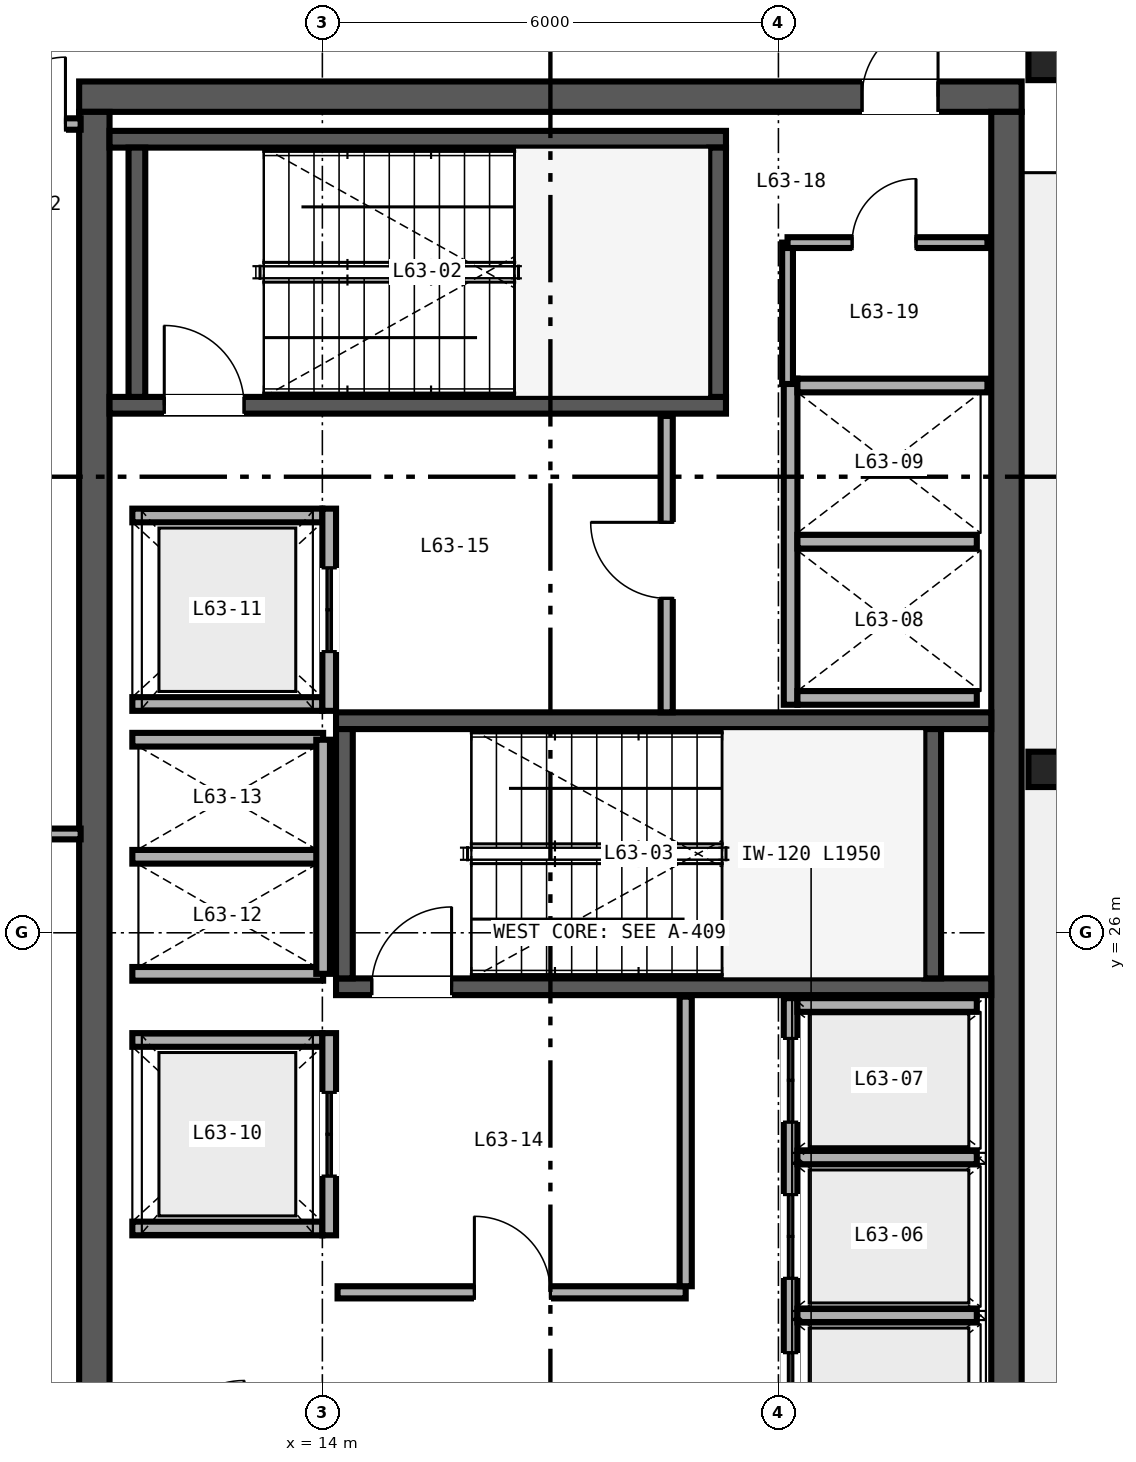
"""IFC4 building model, lengths in metres.
Left out: names, types, materials, properties, quantities, classifications, styles, units other than length and angle.
Written with IfcOpenShell. Run it as: python <this file> out.ifc"""

import sys

from ifc_helpers import new_model, si_unit, direction, frame, frame_2d, origin, origin_2d, place, context, subcontext, project, spatial, rectangle, i_section, extrude, source, transform, mapped, element, fill, save


model = new_model("IFC4")
c1 = context("Model", 3, precision=1e-05, world=origin(), true_north=direction((0.0, 1.0)))
c2 = subcontext(c1, "Body", "Model", "MODEL_VIEW")
j1 = project(units=[si_unit("LENGTHUNIT", "METRE"), si_unit("PLANEANGLEUNIT", "RADIAN")], contexts=[c1])
p1 = place(None, origin())
s1 = spatial("IfcSite", under=j1, at=p1, CompositionType="ELEMENT")
p2 = place(p1, origin())
s2 = spatial("IfcBuilding", under=s1, at=p2, CompositionType="ELEMENT")
p3 = place(p2, frame((0.0, 0.0, 250.8)))
s3 = spatial("IfcBuildingStorey", under=s2, at=p3, CompositionType="ELEMENT", Elevation=250.8)
p4 = place(p3, frame((10.8, 37.0, 0.0), z_axis=(0.0, 0.0, 1.0), x_axis=(1.0, 0.0, 0.0)))
e1 = element("IfcWall", 1, at=p4, inside=s3, PredefinedType="SHEAR", context=c2, shape_type="SweptSolid", body=[
    extrude(rectangle(XDim=12.4, YDim=0.4, at=frame_2d((6.2, 0.0))), origin(), (0.0, 0.0, 1.0), 3.38),
])
p5 = place(p4, frame((10.3, 0.0, 0.0)))
e2 = element("IfcOpeningElement", 2, at=p5, cuts=e1, PredefinedType="OPENING", context=c2, shape_type="SweptSolid", body=[
    extrude(rectangle(XDim=1.0, YDim=2.15, at=frame_2d((0.5, 1.075))), frame((0.0, 0.21, 0.0), z_axis=(0.0, -1.0, 0.0), x_axis=(1.0, 0.0, 0.0)), (0.0, 0.0, 1.0), 0.42),
])
for number, where, z_axis, x_axis in (
    (3, (11.0, 15.2, 0.0), (0.0, 0.0, 1.0), (0.0, 1.0, 0.0)),
    (4, (23.0, 15.2, 0.0), (0.0, 0.0, 1.0), (0.0, 1.0, 0.0)),
):
    element("IfcWall", number, at=place(p3, frame(where, z_axis=z_axis, x_axis=x_axis)), inside=s3, PredefinedType="SHEAR", context=c2, shape_type="SweptSolid", body=[
        extrude(rectangle(XDim=21.6, YDim=0.4, at=frame_2d((10.8, 0.0))), origin(), (0.0, 0.0, 1.0), 3.38),
    ])
p6 = place(p3, frame((11.2, 32.94, 0.0), z_axis=(0.0, 0.0, 1.0), x_axis=(1.0, 0.0, 0.0)))
e5 = element("IfcWall", 5, at=p6, inside=s3, PredefinedType="SHEAR", context=c2, shape_type="SweptSolid", body=[
    extrude(rectangle(XDim=8.11, YDim=0.22, at=frame_2d((4.055, 0.0))), origin(), (0.0, 0.0, 1.0), 3.4),
])
p7 = place(p6, frame((0.72, 0.0, 0.0)))
e6 = element("IfcOpeningElement", 6, at=p7, cuts=e5, PredefinedType="OPENING", context=c2, shape_type="SweptSolid", body=[
    extrude(rectangle(XDim=1.05, YDim=2.15, at=frame_2d((0.525, 1.075))), frame((0.0, 0.12, 0.0), z_axis=(0.0, -1.0, 0.0), x_axis=(1.0, 0.0, 0.0)), (0.0, 0.0, 1.0), 0.24),
])
p8 = place(p3, frame((11.2, 36.44, 0.0), z_axis=(0.0, 0.0, 1.0), x_axis=(1.0, 0.0, 0.0)))
e7 = element("IfcWall", 7, at=p8, inside=s3, PredefinedType="SHEAR", context=c2, shape_type="SweptSolid", body=[
    extrude(rectangle(XDim=8.11, YDim=0.22, at=frame_2d((4.055, 0.0))), origin(), (0.0, 0.0, 1.0), 3.4),
])
for number, where, z_axis, x_axis in (
    (8, (11.56, 33.05, 0.0), (0.0, 0.0, 1.0), (0.0, 1.0, 0.0)),
    (9, (19.2, 33.05, 0.0), (0.0, 0.0, 1.0), (0.0, 1.0, 0.0)),
):
    element("IfcWall", number, at=place(p3, frame(where, z_axis=z_axis, x_axis=x_axis)), inside=s3, PredefinedType="SHEAR", context=c2, shape_type="SweptSolid", body=[
        extrude(rectangle(XDim=3.28, YDim=0.22, at=frame_2d((1.64, 0.0))), origin(), (0.0, 0.0, 1.0), 3.4),
    ])
p9 = place(p3, frame((14.18, 25.29, 0.0), z_axis=(0.0, 0.0, 1.0), x_axis=(1.0, 0.0, 0.0)))
e10 = element("IfcWall", 10, at=p9, inside=s3, PredefinedType="SHEAR", context=c2, shape_type="SweptSolid", body=[
    extrude(rectangle(XDim=8.62, YDim=0.22, at=frame_2d((4.31, 0.0))), origin(), (0.0, 0.0, 1.0), 3.4),
])
p10 = place(p9, frame((0.47, 0.0, 0.0)))
e11 = element("IfcOpeningElement", 11, at=p10, cuts=e10, PredefinedType="OPENING", context=c2, shape_type="SweptSolid", body=[
    extrude(rectangle(XDim=1.05, YDim=2.15, at=frame_2d((0.525, 1.075))), frame((0.0, 0.12, 0.0), z_axis=(0.0, -1.0, 0.0), x_axis=(1.0, 0.0, 0.0)), (0.0, 0.0, 1.0), 0.24),
])
p11 = place(p3, frame((14.18, 28.79, 0.0), z_axis=(0.0, 0.0, 1.0), x_axis=(1.0, 0.0, 0.0)))
e12 = element("IfcWall", 12, at=p11, inside=s3, PredefinedType="SHEAR", context=c2, shape_type="SweptSolid", body=[
    extrude(rectangle(XDim=8.62, YDim=0.22, at=frame_2d((4.31, 0.0))), origin(), (0.0, 0.0, 1.0), 3.4),
])
for number, where, z_axis, x_axis in (
    (13, (14.29, 25.4, 0.0), (0.0, 0.0, 1.0), (0.0, 1.0, 0.0)),
    (14, (22.03, 25.4, 0.0), (0.0, 0.0, 1.0), (0.0, 1.0, 0.0)),
):
    element("IfcWall", number, at=place(p3, frame(where, z_axis=z_axis, x_axis=x_axis)), inside=s3, PredefinedType="SHEAR", context=c2, shape_type="SweptSolid", body=[
        extrude(rectangle(XDim=3.28, YDim=0.22, at=frame_2d((1.64, 0.0))), origin(), (0.0, 0.0, 1.0), 3.4),
    ])
m1 = source(origin(), c2, "Body", "SweptSolid", [
    extrude(i_section(OverallWidth=0.422, OverallDepth=0.465, WebThickness=0.045, FlangeThickness=0.073, FilletRadius=0.025, at=origin_2d()), origin(), (0.0, 0.0, 1.0), 3.38),
])
for number, where, z_axis, x_axis in (
    (15, (23.5, 28.15, 0.0), (0.0, 0.0, 1.0), (1.0, 0.0, 0.0)),
    (16, (23.5, 37.45, 0.0), (0.0, 0.0, 1.0), (1.0, 0.0, 0.0)),
):
    element("IfcColumn", number, at=place(p3, frame(where, z_axis=z_axis, x_axis=x_axis)), inside=s3, PredefinedType="COLUMN", context=c2, shape_type="MappedRepresentation", body=[
        mapped(m1, transform((0.0, 0.0, 0.0), scale=1.0)),
    ])
p12 = place(p3, frame((20.16, 18.82, 0.0), z_axis=(0.0, 0.0, 1.0), x_axis=(0.0, 1.0, 0.0)))
e17 = element("IfcWall", 17, at=p12, inside=s3, PredefinedType="SOLIDWALL", context=c2, shape_type="SweptSolid", body=[
    extrude(rectangle(XDim=6.32, YDim=0.18, at=frame_2d((3.16, 0.0))), origin(), (0.0, 0.0, 1.0), 2.48),
])
p13 = place(p12, frame((0.555, 0.0, 0.0)))
e18 = element("IfcOpeningElement", 18, at=p13, cuts=e17, PredefinedType="OPENING", context=c2, shape_type="SweptSolid", body=[
    extrude(rectangle(XDim=1.1, YDim=2.2, at=frame_2d((0.55, 1.1))), frame((0.0, 0.1, 0.0), z_axis=(0.0, -1.0, 0.0), x_axis=(1.0, 0.0, 0.0)), (0.0, 0.0, 1.0), 0.2),
])
p14 = place(p12, frame((2.635, 0.0, 0.0)))
e19 = element("IfcOpeningElement", 19, at=p14, cuts=e17, PredefinedType="OPENING", context=c2, shape_type="SweptSolid", body=[
    extrude(rectangle(XDim=1.1, YDim=2.2, at=frame_2d((0.55, 1.1))), frame((0.0, 0.1, 0.0), z_axis=(0.0, -1.0, 0.0), x_axis=(1.0, 0.0, 0.0)), (0.0, 0.0, 1.0), 0.2),
])
p15 = place(p12, frame((4.69, 0.0, 0.0)))
e20 = element("IfcOpeningElement", 20, at=p15, cuts=e17, PredefinedType="OPENING", context=c2, shape_type="SweptSolid", body=[
    extrude(rectangle(XDim=1.1, YDim=2.2, at=frame_2d((0.55, 1.1))), frame((0.0, 0.1, 0.0), z_axis=(0.0, -1.0, 0.0), x_axis=(1.0, 0.0, 0.0)), (0.0, 0.0, 1.0), 0.2),
])
p16 = place(p3, frame((20.25, 25.05, 0.0), z_axis=(0.0, 0.0, 1.0), x_axis=(1.0, 0.0, 0.0)))
e21 = element("IfcWall", 21, at=p16, inside=s3, PredefinedType="SOLIDWALL", context=c2, shape_type="SweptSolid", body=[
    extrude(rectangle(XDim=2.36, YDim=0.18, at=frame_2d((1.18, 0.0))), origin(), (0.0, 0.0, 1.0), 3.38),
])
p17 = place(p3, frame((20.25, 20.965, 0.0), z_axis=(0.0, 0.0, 1.0), x_axis=(1.0, 0.0, 0.0)))
e22 = element("IfcWall", 22, at=p17, inside=s3, PredefinedType="SOLIDWALL", context=c2, shape_type="SweptSolid", body=[
    extrude(rectangle(XDim=2.36, YDim=0.18, at=frame_2d((1.18, 0.0))), origin(), (0.0, 0.0, 1.0), 2.48),
])
p18 = place(p3, frame((20.25, 23.045, 0.0), z_axis=(0.0, 0.0, 1.0), x_axis=(1.0, 0.0, 0.0)))
e23 = element("IfcWall", 23, at=p18, inside=s3, PredefinedType="SOLIDWALL", context=c2, shape_type="SweptSolid", body=[
    extrude(rectangle(XDim=2.36, YDim=0.18, at=frame_2d((1.18, 0.0))), origin(), (0.0, 0.0, 1.0), 3.38),
])
p19 = place(p3, frame((20.16, 29.0, 0.0), z_axis=(0.0, 0.0, 1.0), x_axis=(0.0, 1.0, 0.0)))
e24 = element("IfcWall", 24, at=p19, inside=s3, PredefinedType="SOLIDWALL", context=c2, shape_type="SweptSolid", body=[
    extrude(rectangle(XDim=4.29, YDim=0.18, at=frame_2d((2.145, 0.0))), origin(), (0.0, 0.0, 1.0), 3.38),
])
p20 = place(p3, frame((20.25, 29.09, 0.0), z_axis=(0.0, 0.0, 1.0), x_axis=(1.0, 0.0, 0.0)))
e25 = element("IfcWall", 25, at=p20, inside=s3, PredefinedType="SOLIDWALL", context=c2, shape_type="SweptSolid", body=[
    extrude(rectangle(XDim=2.36, YDim=0.18, at=frame_2d((1.18, 0.0))), origin(), (0.0, 0.0, 1.0), 3.38),
])
p21 = place(p3, frame((20.25, 33.2, 0.0), z_axis=(0.0, 0.0, 1.0), x_axis=(1.0, 0.0, 0.0)))
e26 = element("IfcWall", 26, at=p21, inside=s3, PredefinedType="SOLIDWALL", context=c2, shape_type="SweptSolid", body=[
    extrude(rectangle(XDim=2.5, YDim=0.18, at=frame_2d((1.25, 0.0))), origin(), (0.0, 0.0, 1.0), 3.38),
])
p22 = place(p3, frame((20.25, 31.145, 0.0), z_axis=(0.0, 0.0, 1.0), x_axis=(1.0, 0.0, 0.0)))
e27 = element("IfcWall", 27, at=p22, inside=s3, PredefinedType="SOLIDWALL", context=c2, shape_type="SweptSolid", body=[
    extrude(rectangle(XDim=2.36, YDim=0.18, at=frame_2d((1.18, 0.0))), origin(), (0.0, 0.0, 1.0), 3.38),
])
for number, where, z_axis, x_axis in (
    (28, (11.5, 22.11, 0.0), (0.0, 0.0, 1.0), (1.0, 0.0, 0.0)),
    (29, (11.5, 24.59, 0.0), (0.0, 0.0, 1.0), (1.0, 0.0, 0.0)),
):
    element("IfcWall", number, at=place(p3, frame(where, z_axis=z_axis, x_axis=x_axis)), inside=s3, PredefinedType="SOLIDWALL", context=c2, shape_type="SweptSolid", body=[
        extrude(rectangle(XDim=2.5, YDim=0.18, at=frame_2d((1.25, 0.0))), origin(), (0.0, 0.0, 1.0), 3.38),
    ])
p23 = place(p3, frame((14.09, 22.02, 0.0), z_axis=(0.0, 0.0, 1.0), x_axis=(0.0, 1.0, 0.0)))
e30 = element("IfcWall", 30, at=p23, inside=s3, PredefinedType="SOLIDWALL", context=c2, shape_type="SweptSolid", body=[
    extrude(rectangle(XDim=2.66, YDim=0.18, at=frame_2d((1.33, 0.0))), origin(), (0.0, 0.0, 1.0), 3.38),
])
p24 = place(p23, frame((0.78, 0.0, 0.0)))
e31 = element("IfcOpeningElement", 31, at=p24, cuts=e30, PredefinedType="OPENING", context=c2, shape_type="SweptSolid", body=[
    extrude(rectangle(XDim=1.1, YDim=2.2, at=frame_2d((0.55, 1.1))), frame((0.0, 0.1, 0.0), z_axis=(0.0, -1.0, 0.0), x_axis=(1.0, 0.0, 0.0)), (0.0, 0.0, 1.0), 0.2),
])
for number, where, z_axis, x_axis in (
    (32, (11.5, 29.01, 0.0), (0.0, 0.0, 1.0), (1.0, 0.0, 0.0)),
    (33, (11.5, 31.49, 0.0), (0.0, 0.0, 1.0), (1.0, 0.0, 0.0)),
):
    element("IfcWall", number, at=place(p3, frame(where, z_axis=z_axis, x_axis=x_axis)), inside=s3, PredefinedType="SOLIDWALL", context=c2, shape_type="SweptSolid", body=[
        extrude(rectangle(XDim=2.5, YDim=0.18, at=frame_2d((1.25, 0.0))), origin(), (0.0, 0.0, 1.0), 3.38),
    ])
p25 = place(p3, frame((14.09, 28.92, 0.0), z_axis=(0.0, 0.0, 1.0), x_axis=(0.0, 1.0, 0.0)))
e34 = element("IfcWall", 34, at=p25, inside=s3, PredefinedType="SOLIDWALL", context=c2, shape_type="SweptSolid", body=[
    extrude(rectangle(XDim=2.66, YDim=0.18, at=frame_2d((1.33, 0.0))), origin(), (0.0, 0.0, 1.0), 3.38),
])
p26 = place(p25, frame((0.78, 0.0, 0.0)))
e35 = element("IfcOpeningElement", 35, at=p26, cuts=e34, PredefinedType="OPENING", context=c2, shape_type="SweptSolid", body=[
    extrude(rectangle(XDim=1.1, YDim=2.2, at=frame_2d((0.55, 1.1))), frame((0.0, 0.1, 0.0), z_axis=(0.0, -1.0, 0.0), x_axis=(1.0, 0.0, 0.0)), (0.0, 0.0, 1.0), 0.2),
])
for number, where, z_axis, x_axis in (
    (36, (11.5, 25.46, 0.0), (0.0, 0.0, 1.0), (1.0, 0.0, 0.0)),
    (37, (11.5, 27.0, 0.0), (0.0, 0.0, 1.0), (1.0, 0.0, 0.0)),
    (38, (11.5, 28.54, 0.0), (0.0, 0.0, 1.0), (1.0, 0.0, 0.0)),
):
    element("IfcWall", number, at=place(p3, frame(where, z_axis=z_axis, x_axis=x_axis)), inside=s3, PredefinedType="SOLIDWALL", context=c2, shape_type="SweptSolid", body=[
        extrude(rectangle(XDim=2.51, YDim=0.18, at=frame_2d((1.255, 0.0))), origin(), (0.0, 0.0, 1.0), 3.38),
    ])
p27 = place(p3, frame((14.01, 25.46, 0.0), z_axis=(0.0, 0.0, 1.0), x_axis=(0.0, 1.0, 0.0)))
e39 = element("IfcWall", 39, at=p27, inside=s3, PredefinedType="SOLIDWALL", context=c2, shape_type="SweptSolid", body=[
    extrude(rectangle(XDim=3.08, YDim=0.18, at=frame_2d((1.54, 0.0))), origin(), (0.0, 0.0, 1.0), 3.38),
])
p28 = place(p3, frame((14.2, 21.27, 0.0), z_axis=(0.0, 0.0, 1.0), x_axis=(1.0, 0.0, 0.0)))
e40 = element("IfcWall", 40, at=p28, inside=s3, PredefinedType="PARTITIONING", context=c2, shape_type="SweptSolid", body=[
    extrude(rectangle(XDim=4.58, YDim=0.16, at=frame_2d((2.29, 0.0))), origin(), (0.0, 0.0, 1.0), 3.38),
])
p29 = place(p28, frame((1.8, 0.0, 0.0)))
e41 = element("IfcOpeningElement", 41, at=p29, cuts=e40, PredefinedType="OPENING", context=c2, shape_type="SweptSolid", body=[
    extrude(rectangle(XDim=1.0, YDim=2.15, at=frame_2d((0.5, 1.075))), frame((0.0, 0.09, 0.0), z_axis=(0.0, -1.0, 0.0), x_axis=(1.0, 0.0, 0.0)), (0.0, 0.0, 1.0), 0.18),
])
p30 = place(p3, frame((18.78, 21.35, 0.0), z_axis=(0.0, 0.0, 1.0), x_axis=(0.0, 1.0, 0.0)))
e42 = element("IfcWall", 42, at=p30, inside=s3, PredefinedType="PARTITIONING", context=c2, shape_type="SweptSolid", body=[
    extrude(rectangle(XDim=3.81, YDim=0.16, at=frame_2d((1.905, 0.0))), origin(), (0.0, 0.0, 1.0), 3.38),
])
p31 = place(p3, frame((18.53, 28.9, 0.0), z_axis=(0.0, 0.0, 1.0), x_axis=(0.0, 1.0, 0.0)))
e43 = element("IfcWall", 43, at=p31, inside=s3, PredefinedType="PARTITIONING", context=c2, shape_type="SweptSolid", body=[
    extrude(rectangle(XDim=3.9, YDim=0.16, at=frame_2d((1.95, 0.0))), origin(), (0.0, 0.0, 1.0), 3.38),
])
p32 = place(p31, frame((1.5, 0.0, 0.0)))
e44 = element("IfcOpeningElement", 44, at=p32, cuts=e43, PredefinedType="OPENING", context=c2, shape_type="SweptSolid", body=[
    extrude(rectangle(XDim=1.0, YDim=2.15, at=frame_2d((0.5, 1.075))), frame((0.0, 0.09, 0.0), z_axis=(0.0, -1.0, 0.0), x_axis=(1.0, 0.0, 0.0)), (0.0, 0.0, 1.0), 0.18),
])
p33 = place(p3, frame((20.12, 33.22, 0.0), z_axis=(0.0, 0.0, 1.0), x_axis=(0.0, 1.0, 0.0)))
e45 = element("IfcWall", 45, at=p33, inside=s3, PredefinedType="PARTITIONING", context=c2, shape_type="SweptSolid", body=[
    extrude(rectangle(XDim=1.86, YDim=0.142, at=frame_2d((0.93, 0.0))), origin(), (0.0, 0.0, 1.0), 3.38),
])
p34 = place(p3, frame((20.12, 35.08, 0.0), z_axis=(0.0, 0.0, 1.0), x_axis=(1.0, 0.0, 0.0)))
e46 = element("IfcWall", 46, at=p34, inside=s3, PredefinedType="PARTITIONING", context=c2, shape_type="SweptSolid", body=[
    extrude(rectangle(XDim=2.63, YDim=0.142, at=frame_2d((1.315, 0.0))), origin(), (0.0, 0.0, 1.0), 3.38),
])
p35 = place(p34, frame((0.85, 0.0, 0.0)))
e47 = element("IfcOpeningElement", 47, at=p35, cuts=e46, PredefinedType="OPENING", context=c2, shape_type="SweptSolid", body=[
    extrude(rectangle(XDim=0.84, YDim=2.1, at=frame_2d((0.42, 1.05))), frame((0.0, 0.081, 0.0), z_axis=(0.0, -1.0, 0.0), x_axis=(1.0, 0.0, 0.0)), (0.0, 0.0, 1.0), 0.162),
])
p36 = place(p3, frame((8.16, 36.64, 0.0), z_axis=(0.0, 0.0, 1.0), x_axis=(1.0, 0.0, 0.0)))
e48 = element("IfcWall", 48, at=p36, inside=s3, PredefinedType="PARTITIONING", context=c2, shape_type="SweptSolid", body=[
    extrude(rectangle(XDim=2.66, YDim=0.15, at=frame_2d((1.33, 0.0))), origin(), (0.0, 0.0, 1.0), 2.763),
])
p37 = place(p36, frame((1.58, 0.0, 0.0)))
e49 = element("IfcOpeningElement", 49, at=p37, cuts=e48, PredefinedType="OPENING", context=c2, shape_type="SweptSolid", body=[
    extrude(rectangle(XDim=0.88, YDim=2.15, at=frame_2d((0.44, 1.075))), frame((0.0, 0.085, 0.0), z_axis=(0.0, -1.0, 0.0), x_axis=(1.0, 0.0, 0.0)), (0.0, 0.0, 1.0), 0.17),
])
p38 = place(p3, frame((8.16, 27.3, 0.0), z_axis=(0.0, 0.0, 1.0), x_axis=(1.0, 0.0, 0.0)))
e50 = element("IfcWall", 50, at=p38, inside=s3, PredefinedType="PARTITIONING", context=c2, shape_type="SweptSolid", body=[
    extrude(rectangle(XDim=2.66, YDim=0.142, at=frame_2d((1.33, 0.0))), origin(), (0.0, 0.0, 1.0), 2.601),
])
m2 = source(origin(), c2, "Body", "SweptSolid", [
    extrude(rectangle(XDim=1.05, YDim=2.15, at=frame_2d((0.525, 1.075))), frame((0.0, 0.025, 0.0), z_axis=(0.0, -1.0, 0.0), x_axis=(1.0, 0.0, 0.0)), (0.0, 0.0, 1.0), 0.05),
])
p39 = place(p7, origin())
e51 = element("IfcDoor", 51, at=p39, inside=s3, OperationType="SINGLE_SWING_LEFT", PredefinedType="DOOR", context=c2, shape_type="MappedRepresentation", body=[
    mapped(m2, transform((0.0, 0.0, 0.0), scale=1.0)),
])
fill(e6, e51)
p40 = place(p10, origin())
e52 = element("IfcDoor", 52, at=p40, inside=s3, OperationType="SINGLE_SWING_RIGHT", PredefinedType="DOOR", context=c2, shape_type="MappedRepresentation", body=[
    mapped(m2, transform((0.0, 0.0, 0.0), scale=1.0)),
])
fill(e11, e52)
m3 = source(origin(), c2, "Body", "SweptSolid", [
    extrude(rectangle(XDim=1.1, YDim=2.2, at=frame_2d((0.55, 1.1))), frame((0.0, 0.025, 0.0), z_axis=(0.0, -1.0, 0.0), x_axis=(1.0, 0.0, 0.0)), (0.0, 0.0, 1.0), 0.05),
])
p41 = place(p13, origin())
e53 = element("IfcDoor", 53, at=p41, inside=s3, OperationType="DOUBLE_DOOR_SLIDING", PredefinedType="DOOR", context=c2, shape_type="MappedRepresentation", body=[
    mapped(m3, transform((0.0, 0.0, 0.0), scale=1.0)),
])
fill(e18, e53)
p42 = place(p14, origin())
e54 = element("IfcDoor", 54, at=p42, inside=s3, OperationType="DOUBLE_DOOR_SLIDING", PredefinedType="DOOR", context=c2, shape_type="MappedRepresentation", body=[
    mapped(m3, transform((0.0, 0.0, 0.0), scale=1.0)),
])
fill(e19, e54)
p43 = place(p15, origin())
e55 = element("IfcDoor", 55, at=p43, inside=s3, OperationType="DOUBLE_DOOR_SLIDING", PredefinedType="DOOR", context=c2, shape_type="MappedRepresentation", body=[
    mapped(m3, transform((0.0, 0.0, 0.0), scale=1.0)),
])
fill(e20, e55)
p44 = place(p24, origin())
e56 = element("IfcDoor", 56, at=p44, inside=s3, OperationType="DOUBLE_DOOR_SLIDING", PredefinedType="DOOR", context=c2, shape_type="MappedRepresentation", body=[
    mapped(m3, transform((0.0, 0.0, 0.0), scale=1.0)),
])
fill(e31, e56)
p45 = place(p26, origin())
e57 = element("IfcDoor", 57, at=p45, inside=s3, OperationType="DOUBLE_DOOR_SLIDING", PredefinedType="DOOR", context=c2, shape_type="MappedRepresentation", body=[
    mapped(m3, transform((0.0, 0.0, 0.0), scale=1.0)),
])
fill(e35, e57)
m4 = source(origin(), c2, "Body", "SweptSolid", [
    extrude(rectangle(XDim=1.0, YDim=2.15, at=frame_2d((0.5, 1.075))), frame((0.0, 0.025, 0.0), z_axis=(0.0, -1.0, 0.0), x_axis=(1.0, 0.0, 0.0)), (0.0, 0.0, 1.0), 0.05),
])
p46 = place(p29, origin())
e58 = element("IfcDoor", 58, at=p46, inside=s3, OperationType="SINGLE_SWING_LEFT", PredefinedType="DOOR", context=c2, shape_type="MappedRepresentation", body=[
    mapped(m4, transform((0.0, 0.0, 0.0), scale=1.0)),
])
fill(e41, e58)
p47 = place(p32, origin())
e59 = element("IfcDoor", 59, at=p47, inside=s3, OperationType="SINGLE_SWING_RIGHT", PredefinedType="DOOR", context=c2, shape_type="MappedRepresentation", body=[
    mapped(m4, transform((0.0, 0.0, 0.0), scale=1.0)),
])
fill(e44, e59)
m5 = source(origin(), c2, "Body", "SweptSolid", [
    extrude(rectangle(XDim=0.84, YDim=2.1, at=frame_2d((0.42, 1.05))), frame((0.0, 0.025, 0.0), z_axis=(0.0, -1.0, 0.0), x_axis=(1.0, 0.0, 0.0)), (0.0, 0.0, 1.0), 0.05),
])
p48 = place(p35, origin())
e60 = element("IfcDoor", 60, at=p48, inside=s3, OperationType="SINGLE_SWING_RIGHT", PredefinedType="DOOR", context=c2, shape_type="MappedRepresentation", body=[
    mapped(m5, transform((0.0, 0.0, 0.0), scale=1.0)),
])
fill(e47, e60)
p49 = place(p5, origin())
e61 = element("IfcDoor", 61, at=p49, inside=s3, OperationType="SINGLE_SWING_RIGHT", PredefinedType="DOOR", context=c2, shape_type="MappedRepresentation", body=[
    mapped(m4, transform((0.0, 0.0, 0.0), scale=1.0)),
])
fill(e2, e61)
m6 = source(origin(), c2, "Body", "SweptSolid", [
    extrude(rectangle(XDim=0.88, YDim=2.15, at=frame_2d((0.44, 1.075))), frame((0.0, 0.025, 0.0), z_axis=(0.0, -1.0, 0.0), x_axis=(1.0, 0.0, 0.0)), (0.0, 0.0, 1.0), 0.05),
])
p50 = place(p37, origin())
e62 = element("IfcDoor", 62, at=p50, inside=s3, OperationType="SINGLE_SWING_RIGHT", PredefinedType="DOOR", context=c2, shape_type="MappedRepresentation", body=[
    mapped(m6, transform((0.0, 0.0, 0.0), scale=1.0)),
])
fill(e49, e62)
save(model, sys.argv[1])
